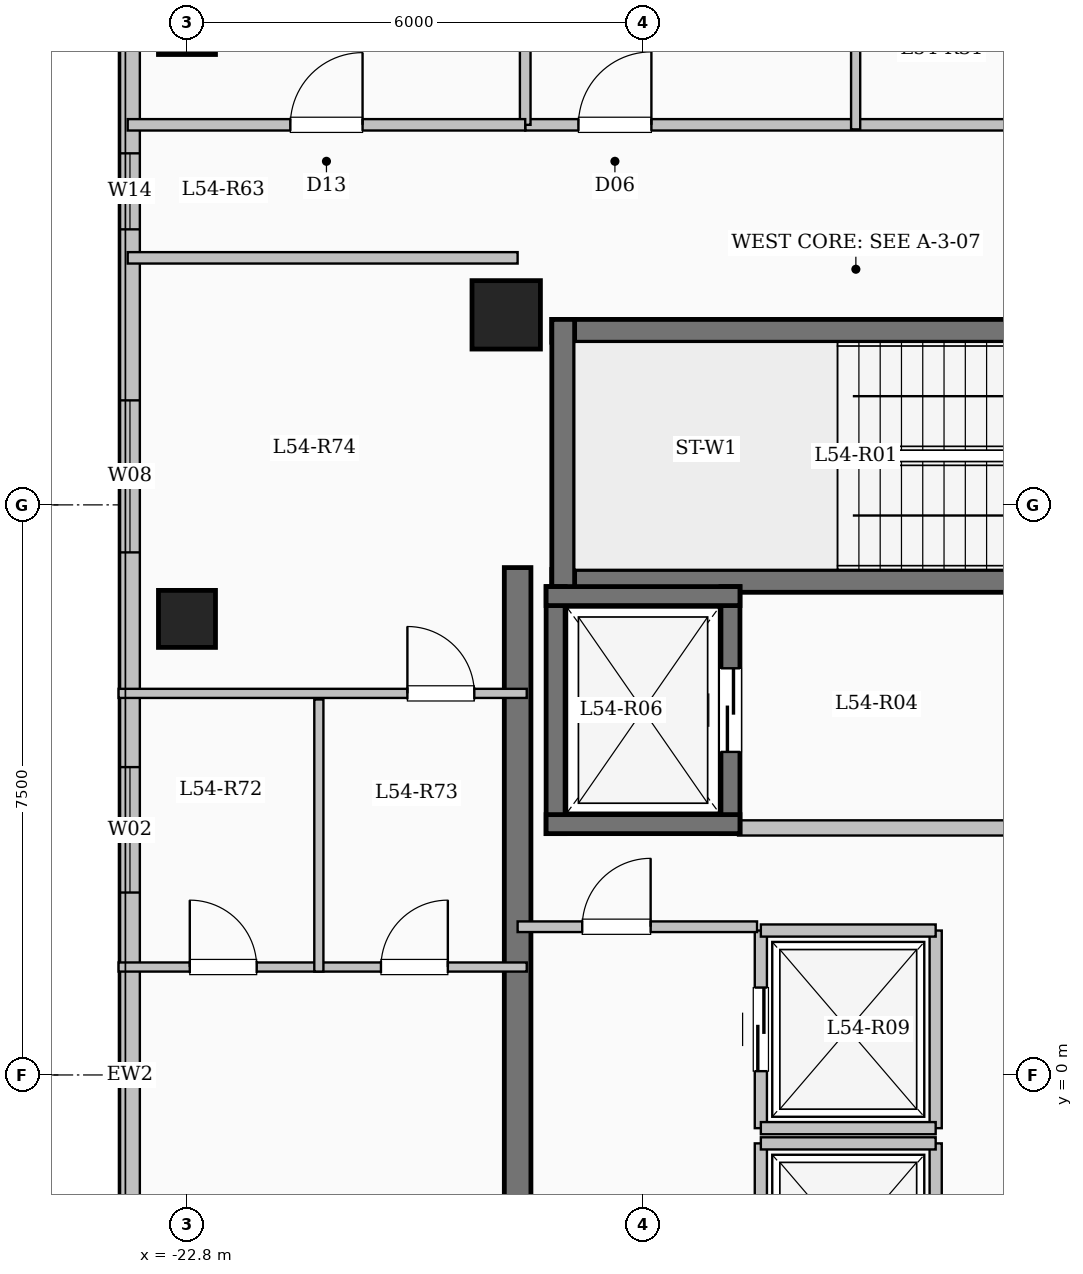
"""IFC4 building model, lengths in metres.
Left out: names, types, materials, properties, quantities, classifications, styles, units other than length and angle.
Written with IfcOpenShell. Run it as: python <this file> out.ifc"""

import sys

from ifc_helpers import new_model, si_unit, direction, frame, frame_2d, origin, origin_2d, place, context, subcontext, project, spatial, rectangle, extrude, element, fill, save


model = new_model("IFC4")
c1 = context("Model", 3, precision=1e-05, world=origin(), true_north=direction((0.0, 1.0)))
c2 = subcontext(c1, "Body", "Model", "MODEL_VIEW")
j1 = project(units=[si_unit("LENGTHUNIT", "METRE"), si_unit("PLANEANGLEUNIT", "RADIAN")], contexts=[c1])
p1 = place(None, origin())
s1 = spatial("IfcSite", under=j1, at=p1, CompositionType="ELEMENT")
p2 = place(p1, origin())
s2 = spatial("IfcBuilding", under=s1, at=p2, CompositionType="ELEMENT")
p3 = place(p2, frame((0.0, 0.0, 200.3)))
s3 = spatial("IfcBuildingStorey", under=s2, at=p3, CompositionType="ELEMENT", Elevation=200.3)
p4 = place(p3, frame((-18.6, 10.0, 0.0), z_axis=(0.0, 0.0, 1.0), x_axis=(1.0, 0.0, 0.0)))
e1 = element("IfcColumn", 1, at=p4, inside=s3, PredefinedType="COLUMN", context=c2, shape_type="SweptSolid", body=[
    extrude(rectangle(XDim=0.9, YDim=0.9, at=origin_2d()), origin(), (0.0, 0.0, 1.0), 3.35),
])
for number, where, z_axis, x_axis in (
    (2, (-22.8, 6.0, 0.0), (0.0, 0.0, 1.0), (1.0, 0.0, 0.0)),
    (3, (-22.8, 13.8, 0.0), (0.0, 0.0, 1.0), (1.0, 0.0, 0.0)),
):
    element("IfcColumn", number, at=place(p3, frame(where, z_axis=z_axis, x_axis=x_axis)), inside=s3, PredefinedType="COLUMN", context=c2, shape_type="SweptSolid", body=[
        extrude(rectangle(XDim=0.75, YDim=0.75, at=origin_2d()), origin(), (0.0, 0.0, 1.0), 3.35),
    ])
p5 = place(p3, frame((-23.55, -17.25, 0.0), z_axis=(0.0, 0.0, 1.0), x_axis=(0.0, 1.0, 0.0)))
e4 = element("IfcWall", 4, at=p5, inside=s3, PredefinedType="SOLIDWALL", context=c2, shape_type="SweptSolid", body=[
    extrude(rectangle(XDim=34.5, YDim=0.26, at=frame_2d((17.25, 0.0))), origin(), (0.0, 0.0, 1.0), 3.1),
])
p6 = place(p5, frame((2.825, 0.0, 0.9)))
e5 = element("IfcOpeningElement", 5, at=p6, cuts=e4, PredefinedType="OPENING", context=c2, shape_type="SweptSolid", body=[
    extrude(rectangle(XDim=2.2, YDim=1.75, at=frame_2d((1.1, 0.875))), frame((0.0, 0.14, 0.0), z_axis=(0.0, -1.0, 0.0), x_axis=(1.0, 0.0, 0.0)), (0.0, 0.0, 1.0), 0.28),
])
p7 = place(p5, frame((8.325, 0.0, 0.95)))
e6 = element("IfcOpeningElement", 6, at=p7, cuts=e4, PredefinedType="OPENING", context=c2, shape_type="SweptSolid", body=[
    extrude(rectangle(XDim=1.2, YDim=1.5, at=frame_2d((0.6, 0.75))), frame((0.0, 0.14, 0.0), z_axis=(0.0, -1.0, 0.0), x_axis=(1.0, 0.0, 0.0)), (0.0, 0.0, 1.0), 0.28),
])
p8 = place(p5, frame((13.25, 0.0, 0.9)))
e7 = element("IfcOpeningElement", 7, at=p8, cuts=e4, PredefinedType="OPENING", context=c2, shape_type="SweptSolid", body=[
    extrude(rectangle(XDim=2.2, YDim=1.75, at=frame_2d((1.1, 0.875))), frame((0.0, 0.14, 0.0), z_axis=(0.0, -1.0, 0.0), x_axis=(1.0, 0.0, 0.0)), (0.0, 0.0, 1.0), 0.28),
])
p9 = place(p5, frame((19.65, 0.0, 0.9)))
e8 = element("IfcOpeningElement", 8, at=p9, cuts=e4, PredefinedType="OPENING", context=c2, shape_type="SweptSolid", body=[
    extrude(rectangle(XDim=1.65, YDim=1.6, at=frame_2d((0.825, 0.8))), frame((0.0, 0.14, 0.0), z_axis=(0.0, -1.0, 0.0), x_axis=(1.0, 0.0, 0.0)), (0.0, 0.0, 1.0), 0.28),
])
p10 = place(p5, frame((24.125, 0.0, 0.9)))
e9 = element("IfcOpeningElement", 9, at=p10, cuts=e4, PredefinedType="OPENING", context=c2, shape_type="SweptSolid", body=[
    extrude(rectangle(XDim=2.0, YDim=1.7, at=frame_2d((1.0, 0.85))), frame((0.0, 0.14, 0.0), z_axis=(0.0, -1.0, 0.0), x_axis=(1.0, 0.0, 0.0)), (0.0, 0.0, 1.0), 0.28),
])
p11 = place(p5, frame((28.375, 0.0, 0.95)))
e10 = element("IfcOpeningElement", 10, at=p11, cuts=e4, PredefinedType="OPENING", context=c2, shape_type="SweptSolid", body=[
    extrude(rectangle(XDim=1.0, YDim=1.5, at=frame_2d((0.5, 0.75))), frame((0.0, 0.14, 0.0), z_axis=(0.0, -1.0, 0.0), x_axis=(1.0, 0.0, 0.0)), (0.0, 0.0, 1.0), 0.28),
])
p12 = place(p5, frame((31.125, 0.0, 0.9)))
e11 = element("IfcOpeningElement", 11, at=p12, cuts=e4, PredefinedType="OPENING", context=c2, shape_type="SweptSolid", body=[
    extrude(rectangle(XDim=2.0, YDim=1.7, at=frame_2d((1.0, 0.85))), frame((0.0, 0.14, 0.0), z_axis=(0.0, -1.0, 0.0), x_axis=(1.0, 0.0, 0.0)), (0.0, 0.0, 1.0), 0.28),
])
p13 = place(p3, frame((-18.0, 9.79, 0.0), z_axis=(0.0, 0.0, 1.0), x_axis=(1.0, 0.0, 0.0)))
e12 = element("IfcWall", 12, at=p13, inside=s3, PredefinedType="SHEAR", context=c2, shape_type="SweptSolid", body=[
    extrude(rectangle(XDim=8.0, YDim=0.3, at=frame_2d((4.0, 0.0))), origin(), (0.0, 0.0, 1.0), 3.35),
])
p14 = place(p3, frame((-18.0, 6.5, 0.0), z_axis=(0.0, 0.0, 1.0), x_axis=(1.0, 0.0, 0.0)))
e13 = element("IfcWall", 13, at=p14, inside=s3, PredefinedType="SHEAR", context=c2, shape_type="SweptSolid", body=[
    extrude(rectangle(XDim=8.0, YDim=0.3, at=frame_2d((4.0, 0.0))), origin(), (0.0, 0.0, 1.0), 3.35),
])
p15 = place(p14, frame((6.45, 0.0, 0.0)))
e14 = element("IfcOpeningElement", 14, at=p15, cuts=e13, PredefinedType="OPENING", context=c2, shape_type="SweptSolid", body=[
    extrude(rectangle(XDim=1.0, YDim=2.15, at=frame_2d((0.5, 1.075))), frame((0.0, 0.16, 0.0), z_axis=(0.0, -1.0, 0.0), x_axis=(1.0, 0.0, 0.0)), (0.0, 0.0, 1.0), 0.32),
])
p16 = place(p3, frame((-17.85, 6.35, 0.0), z_axis=(0.0, 0.0, 1.0), x_axis=(0.0, 1.0, 0.0)))
e15 = element("IfcWall", 15, at=p16, inside=s3, PredefinedType="SHEAR", context=c2, shape_type="SweptSolid", body=[
    extrude(rectangle(XDim=3.59, YDim=0.3, at=frame_2d((1.795, 0.0))), origin(), (0.0, 0.0, 1.0), 3.35),
])
p17 = place(p3, frame((-15.55, 3.25, 0.0), z_axis=(0.0, 0.0, 1.0), x_axis=(1.0, 0.0, 0.0)))
e16 = element("IfcWall", 16, at=p17, inside=s3, PredefinedType="SOLIDWALL", context=c2, shape_type="SweptSolid", body=[
    extrude(rectangle(XDim=5.4, YDim=0.2, at=frame_2d((2.7, 0.0))), origin(), (0.0, 0.0, 1.0), 3.1),
])
p18 = place(p3, frame((-17.95, 3.175, 0.0), z_axis=(0.0, 0.0, 1.0), x_axis=(0.0, 1.0, 0.0)))
e17 = element("IfcWall", 17, at=p18, inside=s3, PredefinedType="SHEAR", context=c2, shape_type="SweptSolid", body=[
    extrude(rectangle(XDim=3.25, YDim=0.25, at=frame_2d((1.625, 0.0))), origin(), (0.0, 0.0, 1.0), 3.35),
])
p19 = place(p3, frame((-15.65, 3.175, 0.0), z_axis=(0.0, 0.0, 1.0), x_axis=(0.0, 1.0, 0.0)))
e18 = element("IfcWall", 18, at=p19, inside=s3, PredefinedType="SHEAR", context=c2, shape_type="SweptSolid", body=[
    extrude(rectangle(XDim=3.25, YDim=0.25, at=frame_2d((1.625, 0.0))), origin(), (0.0, 0.0, 1.0), 3.35),
])
p20 = place(p19, frame((1.075, 0.0, 0.0)))
e19 = element("IfcOpeningElement", 19, at=p20, cuts=e18, PredefinedType="OPENING", context=c2, shape_type="SweptSolid", body=[
    extrude(rectangle(XDim=1.1, YDim=2.15, at=frame_2d((0.55, 1.075))), frame((0.0, 0.135, 0.0), z_axis=(0.0, -1.0, 0.0), x_axis=(1.0, 0.0, 0.0)), (0.0, 0.0, 1.0), 0.27),
])
for number, where, z_axis, x_axis in (
    (20, (-18.075, 3.3, 0.0), (0.0, 0.0, 1.0), (1.0, 0.0, 0.0)),
    (21, (-18.075, 6.3, 0.0), (0.0, 0.0, 1.0), (1.0, 0.0, 0.0)),
):
    element("IfcWall", number, at=place(p3, frame(where, z_axis=z_axis, x_axis=x_axis)), inside=s3, PredefinedType="SHEAR", context=c2, shape_type="SweptSolid", body=[
        extrude(rectangle(XDim=2.55, YDim=0.25, at=frame_2d((1.275, 0.0))), origin(), (0.0, 0.0, 1.0), 3.35),
    ])
p21 = place(p3, frame((-15.25, -3.5, 0.0), z_axis=(0.0, 0.0, 1.0), x_axis=(0.0, 1.0, 0.0)))
e22 = element("IfcWall", 22, at=p21, inside=s3, PredefinedType="SOLIDWALL", context=c2, shape_type="SweptSolid", body=[
    extrude(rectangle(XDim=2.6, YDim=0.16, at=frame_2d((1.3, 0.0))), origin(), (0.0, 0.0, 1.0), 3.1),
])
p22 = place(p21, frame((0.75, 0.0, 0.0)))
e23 = element("IfcOpeningElement", 23, at=p22, cuts=e22, PredefinedType="OPENING", context=c2, shape_type="SweptSolid", body=[
    extrude(rectangle(XDim=1.1, YDim=2.15, at=frame_2d((0.55, 1.075))), frame((0.0, 0.09, 0.0), z_axis=(0.0, -1.0, 0.0), x_axis=(1.0, 0.0, 0.0)), (0.0, 0.0, 1.0), 0.18),
])
p23 = place(p3, frame((-12.95, -3.5, 0.0), z_axis=(0.0, 0.0, 1.0), x_axis=(0.0, 1.0, 0.0)))
e24 = element("IfcWall", 24, at=p23, inside=s3, PredefinedType="SOLIDWALL", context=c2, shape_type="SweptSolid", body=[
    extrude(rectangle(XDim=2.6, YDim=0.16, at=frame_2d((1.3, 0.0))), origin(), (0.0, 0.0, 1.0), 3.1),
])
p24 = place(p3, frame((-15.25, -0.9, 0.0), z_axis=(0.0, 0.0, 1.0), x_axis=(1.0, 0.0, 0.0)))
e25 = element("IfcWall", 25, at=p24, inside=s3, PredefinedType="SOLIDWALL", context=c2, shape_type="SweptSolid", body=[
    extrude(rectangle(XDim=2.3, YDim=0.16, at=frame_2d((1.15, 0.0))), origin(), (0.0, 0.0, 1.0), 3.1),
])
p25 = place(p3, frame((-15.25, -0.7, 0.0), z_axis=(0.0, 0.0, 1.0), x_axis=(0.0, 1.0, 0.0)))
e26 = element("IfcWall", 26, at=p25, inside=s3, PredefinedType="SOLIDWALL", context=c2, shape_type="SweptSolid", body=[
    extrude(rectangle(XDim=2.6, YDim=0.16, at=frame_2d((1.3, 0.0))), origin(), (0.0, 0.0, 1.0), 3.1),
])
p26 = place(p25, frame((0.75, 0.0, 0.0)))
e27 = element("IfcOpeningElement", 27, at=p26, cuts=e26, PredefinedType="OPENING", context=c2, shape_type="SweptSolid", body=[
    extrude(rectangle(XDim=1.1, YDim=2.15, at=frame_2d((0.55, 1.075))), frame((0.0, 0.09, 0.0), z_axis=(0.0, -1.0, 0.0), x_axis=(1.0, 0.0, 0.0)), (0.0, 0.0, 1.0), 0.18),
])
p27 = place(p3, frame((-12.95, -0.7, 0.0), z_axis=(0.0, 0.0, 1.0), x_axis=(0.0, 1.0, 0.0)))
e28 = element("IfcWall", 28, at=p27, inside=s3, PredefinedType="SOLIDWALL", context=c2, shape_type="SweptSolid", body=[
    extrude(rectangle(XDim=2.6, YDim=0.16, at=frame_2d((1.3, 0.0))), origin(), (0.0, 0.0, 1.0), 3.1),
])
for number, where, z_axis, x_axis in (
    (29, (-15.25, -0.7, 0.0), (0.0, 0.0, 1.0), (1.0, 0.0, 0.0)),
    (30, (-15.25, 1.9, 0.0), (0.0, 0.0, 1.0), (1.0, 0.0, 0.0)),
):
    element("IfcWall", number, at=place(p3, frame(where, z_axis=z_axis, x_axis=x_axis)), inside=s3, PredefinedType="SOLIDWALL", context=c2, shape_type="SweptSolid", body=[
        extrude(rectangle(XDim=2.3, YDim=0.16, at=frame_2d((1.15, 0.0))), origin(), (0.0, 0.0, 1.0), 3.1),
    ])
p28 = place(p3, frame((-18.45, -7.375, 0.0), z_axis=(0.0, 0.0, 1.0), x_axis=(0.0, 1.0, 0.0)))
e31 = element("IfcWall", 31, at=p28, inside=s3, PredefinedType="SHEAR", context=c2, shape_type="SweptSolid", body=[
    extrude(rectangle(XDim=14.05, YDim=0.35, at=frame_2d((7.025, 0.0))), origin(), (0.0, 0.0, 1.0), 3.35),
])
p29 = place(p3, frame((-18.45, 1.95, 0.0), z_axis=(0.0, 0.0, 1.0), x_axis=(1.0, 0.0, 0.0)))
e32 = element("IfcWall", 32, at=p29, inside=s3, PredefinedType="PARTITIONING", context=c2, shape_type="SweptSolid", body=[
    extrude(rectangle(XDim=3.15, YDim=0.14, at=frame_2d((1.575, 0.0))), origin(), (0.0, 0.0, 1.0), 3.1),
])
p30 = place(p29, frame((0.85, 0.0, 0.0)))
e33 = element("IfcOpeningElement", 33, at=p30, cuts=e32, PredefinedType="OPENING", context=c2, shape_type="SweptSolid", body=[
    extrude(rectangle(XDim=0.9, YDim=2.08, at=frame_2d((0.45, 1.04))), frame((0.0, 0.08, 0.0), z_axis=(0.0, -1.0, 0.0), x_axis=(1.0, 0.0, 0.0)), (0.0, 0.0, 1.0), 0.16),
])
p31 = place(p3, frame((-18.35, 12.5, 0.0), z_axis=(0.0, 0.0, 1.0), x_axis=(1.0, 0.0, 0.0)))
e34 = element("IfcWall", 34, at=p31, inside=s3, PredefinedType="PARTITIONING", context=c2, shape_type="SweptSolid", body=[
    extrude(rectangle(XDim=14.5, YDim=0.15, at=frame_2d((7.25, 0.0))), origin(), (0.0, 0.0, 1.0), 3.1),
])
p32 = place(p31, frame((0.7, 0.0, 0.0)))
e35 = element("IfcOpeningElement", 35, at=p32, cuts=e34, PredefinedType="OPENING", context=c2, shape_type="SweptSolid", body=[
    extrude(rectangle(XDim=0.96, YDim=2.15, at=frame_2d((0.48, 1.075))), frame((0.0, 0.085, 0.0), z_axis=(0.0, -1.0, 0.0), x_axis=(1.0, 0.0, 0.0)), (0.0, 0.0, 1.0), 0.17),
])
p33 = place(p31, frame((9.394, 0.0, 0.0)))
e36 = element("IfcOpeningElement", 36, at=p33, cuts=e34, PredefinedType="OPENING", context=c2, shape_type="SweptSolid", body=[
    extrude(rectangle(XDim=0.96, YDim=2.15, at=frame_2d((0.48, 1.075))), frame((0.0, 0.085, 0.0), z_axis=(0.0, -1.0, 0.0), x_axis=(1.0, 0.0, 0.0)), (0.0, 0.0, 1.0), 0.17),
])
p34 = place(p3, frame((-14.003, 12.44, 0.0), z_axis=(0.0, 0.0, 1.0), x_axis=(0.0, 1.0, 0.0)))
e37 = element("IfcWall", 37, at=p34, inside=s3, PredefinedType="PARTITIONING", context=c2, shape_type="SweptSolid", body=[
    extrude(rectangle(XDim=8.46, YDim=0.12, at=frame_2d((4.23, 0.0))), origin(), (0.0, 0.0, 1.0), 3.1),
])
p35 = place(p34, frame((2.905, 0.0, 0.0)))
e38 = element("IfcOpeningElement", 38, at=p35, cuts=e37, PredefinedType="OPENING", context=c2, shape_type="SweptSolid", body=[
    extrude(rectangle(XDim=1.08, YDim=2.15, at=frame_2d((0.54, 1.075))), frame((0.0, 0.07, 0.0), z_axis=(0.0, -1.0, 0.0), x_axis=(1.0, 0.0, 0.0)), (0.0, 0.0, 1.0), 0.14),
])
p36 = place(p3, frame((-23.58, 10.75, 0.0), z_axis=(0.0, 0.0, 1.0), x_axis=(1.0, 0.0, 0.0)))
e39 = element("IfcWall", 39, at=p36, inside=s3, PredefinedType="PARTITIONING", context=c2, shape_type="SweptSolid", body=[
    extrude(rectangle(XDim=5.13, YDim=0.15, at=frame_2d((2.565, 0.0))), origin(), (0.0, 0.0, 1.0), 3.1),
])
p37 = place(p3, frame((-18.35, 12.5, 0.0), z_axis=(0.0, 0.0, 1.0), x_axis=(0.0, 1.0, 0.0)))
e40 = element("IfcWall", 40, at=p37, inside=s3, PredefinedType="PARTITIONING", context=c2, shape_type="SweptSolid", body=[
    extrude(rectangle(XDim=4.75, YDim=0.14, at=frame_2d((2.375, 0.0))), origin(), (0.0, 0.0, 1.0), 3.1),
])
p38 = place(p3, frame((-23.58, 12.5, 0.0), z_axis=(0.0, 0.0, 1.0), x_axis=(1.0, 0.0, 0.0)))
e41 = element("IfcWall", 41, at=p38, inside=s3, PredefinedType="PARTITIONING", context=c2, shape_type="SweptSolid", body=[
    extrude(rectangle(XDim=5.23, YDim=0.15, at=frame_2d((2.615, 0.0))), origin(), (0.0, 0.0, 1.0), 3.1),
])
p39 = place(p38, frame((2.14, 0.0, 0.0)))
e42 = element("IfcOpeningElement", 42, at=p39, cuts=e41, PredefinedType="OPENING", context=c2, shape_type="SweptSolid", body=[
    extrude(rectangle(XDim=0.95, YDim=2.15, at=frame_2d((0.475, 1.075))), frame((0.0, 0.085, 0.0), z_axis=(0.0, -1.0, 0.0), x_axis=(1.0, 0.0, 0.0)), (0.0, 0.0, 1.0), 0.17),
])
p40 = place(p3, frame((-23.7, 1.42, 0.0), z_axis=(0.0, 0.0, 1.0), x_axis=(1.0, 0.0, 0.0)))
e43 = element("IfcWall", 43, at=p40, inside=s3, PredefinedType="PARTITIONING", context=c2, shape_type="SweptSolid", body=[
    extrude(rectangle(XDim=5.37, YDim=0.12, at=frame_2d((2.685, 0.0))), origin(), (0.0, 0.0, 1.0), 3.1),
])
p41 = place(p40, frame((0.937, 0.0, 0.0)))
e44 = element("IfcOpeningElement", 44, at=p41, cuts=e43, PredefinedType="OPENING", context=c2, shape_type="SweptSolid", body=[
    extrude(rectangle(XDim=0.88, YDim=2.1, at=frame_2d((0.44, 1.05))), frame((0.0, 0.07, 0.0), z_axis=(0.0, -1.0, 0.0), x_axis=(1.0, 0.0, 0.0)), (0.0, 0.0, 1.0), 0.14),
])
p42 = place(p40, frame((3.452, 0.0, 0.0)))
e45 = element("IfcOpeningElement", 45, at=p42, cuts=e43, PredefinedType="OPENING", context=c2, shape_type="SweptSolid", body=[
    extrude(rectangle(XDim=0.88, YDim=2.1, at=frame_2d((0.44, 1.05))), frame((0.0, 0.07, 0.0), z_axis=(0.0, -1.0, 0.0), x_axis=(1.0, 0.0, 0.0)), (0.0, 0.0, 1.0), 0.14),
])
p43 = place(p3, frame((-23.7, 5.02, 0.0), z_axis=(0.0, 0.0, 1.0), x_axis=(1.0, 0.0, 0.0)))
e46 = element("IfcWall", 46, at=p43, inside=s3, PredefinedType="PARTITIONING", context=c2, shape_type="SweptSolid", body=[
    extrude(rectangle(XDim=5.37, YDim=0.12, at=frame_2d((2.685, 0.0))), origin(), (0.0, 0.0, 1.0), 3.1),
])
p44 = place(p43, frame((3.8, 0.0, 0.0)))
e47 = element("IfcOpeningElement", 47, at=p44, cuts=e46, PredefinedType="OPENING", context=c2, shape_type="SweptSolid", body=[
    extrude(rectangle(XDim=0.88, YDim=2.1, at=frame_2d((0.44, 1.05))), frame((0.0, 0.07, 0.0), z_axis=(0.0, -1.0, 0.0), x_axis=(1.0, 0.0, 0.0)), (0.0, 0.0, 1.0), 0.14),
])
p45 = place(p3, frame((-21.065, 1.36, 0.0), z_axis=(0.0, 0.0, 1.0), x_axis=(0.0, 1.0, 0.0)))
e48 = element("IfcWall", 48, at=p45, inside=s3, PredefinedType="PARTITIONING", context=c2, shape_type="SweptSolid", body=[
    extrude(rectangle(XDim=3.58, YDim=0.12, at=frame_2d((1.79, 0.0))), origin(), (0.0, 0.0, 1.0), 3.1),
])
p46 = place(p9, origin())
e49 = element("IfcWindow", 49, at=p46, inside=s3, PartitioningType="SINGLE_PANEL", PredefinedType="WINDOW", context=c2, shape_type="SweptSolid", body=[
    extrude(rectangle(XDim=1.65, YDim=1.6, at=frame_2d((0.825, 0.8))), frame((0.0, 0.03, 0.0), z_axis=(0.0, -1.0, 0.0), x_axis=(1.0, 0.0, 0.0)), (0.0, 0.0, 1.0), 0.06),
])
fill(e8, e49)
p47 = place(p10, origin())
e50 = element("IfcWindow", 50, at=p47, inside=s3, PartitioningType="SINGLE_PANEL", PredefinedType="WINDOW", context=c2, shape_type="SweptSolid", body=[
    extrude(rectangle(XDim=2.0, YDim=1.7, at=frame_2d((1.0, 0.85))), frame((0.0, 0.03, 0.0), z_axis=(0.0, -1.0, 0.0), x_axis=(1.0, 0.0, 0.0)), (0.0, 0.0, 1.0), 0.06),
])
fill(e9, e50)
p48 = place(p11, origin())
e51 = element("IfcWindow", 51, at=p48, inside=s3, PartitioningType="SINGLE_PANEL", PredefinedType="WINDOW", context=c2, shape_type="SweptSolid", body=[
    extrude(rectangle(XDim=1.0, YDim=1.5, at=frame_2d((0.5, 0.75))), frame((0.0, 0.03, 0.0), z_axis=(0.0, -1.0, 0.0), x_axis=(1.0, 0.0, 0.0)), (0.0, 0.0, 1.0), 0.06),
])
fill(e10, e51)
p49 = place(p20, origin())
e52 = element("IfcDoor", 52, at=p49, inside=s3, OperationType="SLIDING_TO_LEFT", PredefinedType="DOOR", context=c2, shape_type="SweptSolid", body=[
    extrude(rectangle(XDim=1.1, YDim=2.15, at=frame_2d((0.55, 1.075))), frame((0.0, 0.025, 0.0), z_axis=(0.0, -1.0, 0.0), x_axis=(1.0, 0.0, 0.0)), (0.0, 0.0, 1.0), 0.05),
])
fill(e19, e52)
p50 = place(p26, origin())
e53 = element("IfcDoor", 53, at=p50, inside=s3, OperationType="SLIDING_TO_LEFT", PredefinedType="DOOR", context=c2, shape_type="SweptSolid", body=[
    extrude(rectangle(XDim=1.1, YDim=2.15, at=frame_2d((0.55, 1.075))), frame((0.0, 0.025, 0.0), z_axis=(0.0, -1.0, 0.0), x_axis=(1.0, 0.0, 0.0)), (0.0, 0.0, 1.0), 0.05),
])
fill(e27, e53)
p51 = place(p30, origin())
e54 = element("IfcDoor", 54, at=p51, inside=s3, OperationType="SINGLE_SWING_RIGHT", PredefinedType="DOOR", context=c2, shape_type="SweptSolid", body=[
    extrude(rectangle(XDim=0.9, YDim=2.08, at=frame_2d((0.45, 1.04))), frame((0.0, 0.025, 0.0), z_axis=(0.0, -1.0, 0.0), x_axis=(1.0, 0.0, 0.0)), (0.0, 0.0, 1.0), 0.05),
])
fill(e33, e54)
p52 = place(p32, origin())
e55 = element("IfcDoor", 55, at=p52, inside=s3, OperationType="SINGLE_SWING_RIGHT", PredefinedType="DOOR", context=c2, shape_type="SweptSolid", body=[
    extrude(rectangle(XDim=0.96, YDim=2.15, at=frame_2d((0.48, 1.075))), frame((0.0, 0.025, 0.0), z_axis=(0.0, -1.0, 0.0), x_axis=(1.0, 0.0, 0.0)), (0.0, 0.0, 1.0), 0.05),
])
fill(e35, e55)
p53 = place(p39, origin())
e56 = element("IfcDoor", 56, at=p53, inside=s3, OperationType="SINGLE_SWING_RIGHT", PredefinedType="DOOR", context=c2, shape_type="SweptSolid", body=[
    extrude(rectangle(XDim=0.95, YDim=2.15, at=frame_2d((0.475, 1.075))), frame((0.0, 0.025, 0.0), z_axis=(0.0, -1.0, 0.0), x_axis=(1.0, 0.0, 0.0)), (0.0, 0.0, 1.0), 0.05),
])
fill(e42, e56)
p54 = place(p41, origin())
e57 = element("IfcDoor", 57, at=p54, inside=s3, OperationType="SINGLE_SWING_LEFT", PredefinedType="DOOR", context=c2, shape_type="SweptSolid", body=[
    extrude(rectangle(XDim=0.88, YDim=2.1, at=frame_2d((0.44, 1.05))), frame((0.0, 0.025, 0.0), z_axis=(0.0, -1.0, 0.0), x_axis=(1.0, 0.0, 0.0)), (0.0, 0.0, 1.0), 0.05),
])
fill(e44, e57)
p55 = place(p42, origin())
e58 = element("IfcDoor", 58, at=p55, inside=s3, OperationType="SINGLE_SWING_RIGHT", PredefinedType="DOOR", context=c2, shape_type="SweptSolid", body=[
    extrude(rectangle(XDim=0.88, YDim=2.1, at=frame_2d((0.44, 1.05))), frame((0.0, 0.025, 0.0), z_axis=(0.0, -1.0, 0.0), x_axis=(1.0, 0.0, 0.0)), (0.0, 0.0, 1.0), 0.05),
])
fill(e45, e58)
p56 = place(p44, origin())
e59 = element("IfcDoor", 59, at=p56, inside=s3, OperationType="SINGLE_SWING_LEFT", PredefinedType="DOOR", context=c2, shape_type="SweptSolid", body=[
    extrude(rectangle(XDim=0.88, YDim=2.1, at=frame_2d((0.44, 1.05))), frame((0.0, 0.025, 0.0), z_axis=(0.0, -1.0, 0.0), x_axis=(1.0, 0.0, 0.0)), (0.0, 0.0, 1.0), 0.05),
])
fill(e47, e59)
save(model, sys.argv[1])
